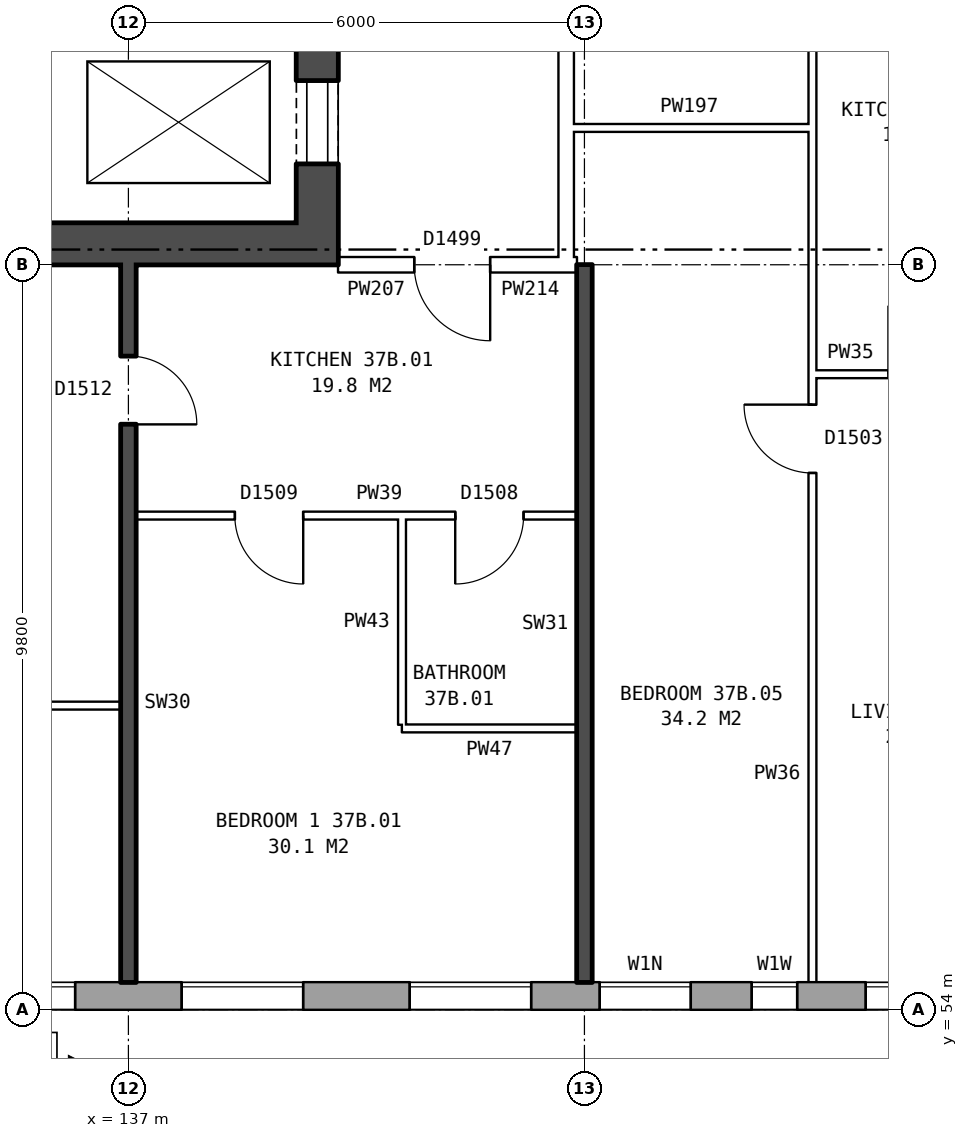
"""IFC4 building model, lengths in metres.
Left out: names, types, materials, properties, quantities, classifications, styles, units other than length and angle.
Written with IfcOpenShell. Run it as: python <this file> out.ifc"""

import sys

from ifc_helpers import new_model, si_unit, direction, frame, frame_2d, origin, place, context, subcontext, project, spatial, rectangle, extrude, element, fill, save


model = new_model("IFC4")
c1 = context("Model", 3, precision=1e-05, world=origin(), true_north=direction((0.0, 1.0)))
c2 = subcontext(c1, "Body", "Model", "MODEL_VIEW")
j1 = project(units=[si_unit("LENGTHUNIT", "METRE"), si_unit("PLANEANGLEUNIT", "RADIAN")], contexts=[c1])
p1 = place(None, origin())
s1 = spatial("IfcSite", under=j1, at=p1, CompositionType="ELEMENT")
p2 = place(p1, origin())
s2 = spatial("IfcBuilding", under=s1, at=p2, CompositionType="ELEMENT")
p3 = place(p2, frame((0.0, 0.0, 133.0)))
s3 = spatial("IfcBuildingStorey", under=s2, at=p3, CompositionType="ELEMENT", Elevation=133.0)
p4 = place(p3, frame((134.075, 54.18, 0.0), z_axis=(0.0, 0.0, 1.0), x_axis=(1.0, 0.0, 0.0)))
e1 = element("IfcWall", 1, at=p4, inside=s3, PredefinedType="STANDARD", context=c2, shape_type="SweptSolid", body=[
    extrude(rectangle(XDim=35.601, YDim=0.36, at=frame_2d((17.8, 0.0))), origin(), (0.0, 0.0, 1.0), 2.85),
])
p5 = place(p4, frame((0.625, 0.0, 0.8)))
e2 = element("IfcOpeningElement", 2, at=p5, cuts=e1, PredefinedType="OPENING", context=c2, shape_type="SweptSolid", body=[
    extrude(rectangle(XDim=1.6, YDim=1.8, at=frame_2d((0.8, 0.9))), frame((0.0, 0.19, 0.0), z_axis=(0.0, -1.0, 0.0), x_axis=(1.0, 0.0, 0.0)), (0.0, 0.0, 1.0), 0.38),
])
p6 = place(p4, frame((3.625, 0.0, 0.8)))
e3 = element("IfcOpeningElement", 3, at=p6, cuts=e1, PredefinedType="OPENING", context=c2, shape_type="SweptSolid", body=[
    extrude(rectangle(XDim=1.6, YDim=1.8, at=frame_2d((0.8, 0.9))), frame((0.0, 0.19, 0.0), z_axis=(0.0, -1.0, 0.0), x_axis=(1.0, 0.0, 0.0)), (0.0, 0.0, 1.0), 0.38),
])
p7 = place(p4, frame((6.625, 0.0, 0.8)))
e4 = element("IfcOpeningElement", 4, at=p7, cuts=e1, PredefinedType="OPENING", context=c2, shape_type="SweptSolid", body=[
    extrude(rectangle(XDim=1.6, YDim=1.8, at=frame_2d((0.8, 0.9))), frame((0.0, 0.19, 0.0), z_axis=(0.0, -1.0, 0.0), x_axis=(1.0, 0.0, 0.0)), (0.0, 0.0, 1.0), 0.38),
])
p8 = place(p4, frame((9.125, 0.0, 1.35)))
e5 = element("IfcOpeningElement", 5, at=p8, cuts=e1, PredefinedType="OPENING", context=c2, shape_type="SweptSolid", body=[
    extrude(rectangle(XDim=1.2, YDim=1.2, at=frame_2d((0.6, 0.6))), frame((0.0, 0.19, 0.0), z_axis=(0.0, -1.0, 0.0), x_axis=(1.0, 0.0, 0.0)), (0.0, 0.0, 1.0), 0.38),
])
p9 = place(p4, frame((12.625, 0.0, 0.8)))
e6 = element("IfcOpeningElement", 6, at=p9, cuts=e1, PredefinedType="OPENING", context=c2, shape_type="SweptSolid", body=[
    extrude(rectangle(XDim=1.6, YDim=1.8, at=frame_2d((0.8, 0.9))), frame((0.0, 0.19, 0.0), z_axis=(0.0, -1.0, 0.0), x_axis=(1.0, 0.0, 0.0)), (0.0, 0.0, 1.0), 0.38),
])
p10 = place(p4, frame((15.625, 0.0, 0.8)))
e7 = element("IfcOpeningElement", 7, at=p10, cuts=e1, PredefinedType="OPENING", context=c2, shape_type="SweptSolid", body=[
    extrude(rectangle(XDim=1.6, YDim=1.8, at=frame_2d((0.8, 0.9))), frame((0.0, 0.19, 0.0), z_axis=(0.0, -1.0, 0.0), x_axis=(1.0, 0.0, 0.0)), (0.0, 0.0, 1.0), 0.38),
])
p11 = place(p4, frame((18.625, 0.0, 0.8)))
e8 = element("IfcOpeningElement", 8, at=p11, cuts=e1, PredefinedType="OPENING", context=c2, shape_type="SweptSolid", body=[
    extrude(rectangle(XDim=1.6, YDim=1.8, at=frame_2d((0.8, 0.9))), frame((0.0, 0.19, 0.0), z_axis=(0.0, -1.0, 0.0), x_axis=(1.0, 0.0, 0.0)), (0.0, 0.0, 1.0), 0.38),
])
p12 = place(p4, frame((21.625, 0.0, 0.8)))
e9 = element("IfcOpeningElement", 9, at=p12, cuts=e1, PredefinedType="OPENING", context=c2, shape_type="SweptSolid", body=[
    extrude(rectangle(XDim=1.6, YDim=1.8, at=frame_2d((0.8, 0.9))), frame((0.0, 0.19, 0.0), z_axis=(0.0, -1.0, 0.0), x_axis=(1.0, 0.0, 0.0)), (0.0, 0.0, 1.0), 0.38),
])
p13 = place(p4, frame((24.975, 0.0, 1.7)))
e10 = element("IfcOpeningElement", 10, at=p13, cuts=e1, PredefinedType="OPENING", context=c2, shape_type="SweptSolid", body=[
    extrude(rectangle(XDim=0.6, YDim=0.9, at=frame_2d((0.3, 0.45))), frame((0.0, 0.19, 0.0), z_axis=(0.0, -1.0, 0.0), x_axis=(1.0, 0.0, 0.0)), (0.0, 0.0, 1.0), 0.38),
])
p14 = place(p4, frame((27.625, 0.0, 0.8)))
e11 = element("IfcOpeningElement", 11, at=p14, cuts=e1, PredefinedType="OPENING", context=c2, shape_type="SweptSolid", body=[
    extrude(rectangle(XDim=1.6, YDim=1.8, at=frame_2d((0.8, 0.9))), frame((0.0, 0.19, 0.0), z_axis=(0.0, -1.0, 0.0), x_axis=(1.0, 0.0, 0.0)), (0.0, 0.0, 1.0), 0.38),
])
p15 = place(p4, frame((30.625, 0.0, 0.8)))
e12 = element("IfcOpeningElement", 12, at=p15, cuts=e1, PredefinedType="OPENING", context=c2, shape_type="SweptSolid", body=[
    extrude(rectangle(XDim=1.6, YDim=1.8, at=frame_2d((0.8, 0.9))), frame((0.0, 0.19, 0.0), z_axis=(0.0, -1.0, 0.0), x_axis=(1.0, 0.0, 0.0)), (0.0, 0.0, 1.0), 0.38),
])
p16 = place(p4, frame((33.625, 0.0, 0.8)))
e13 = element("IfcOpeningElement", 13, at=p16, cuts=e1, PredefinedType="OPENING", context=c2, shape_type="SweptSolid", body=[
    extrude(rectangle(XDim=1.6, YDim=1.8, at=frame_2d((0.8, 0.9))), frame((0.0, 0.19, 0.0), z_axis=(0.0, -1.0, 0.0), x_axis=(1.0, 0.0, 0.0)), (0.0, 0.0, 1.0), 0.38),
])
p17 = place(p4, frame((11.125, 0.0, 0.15)))
e14 = element("IfcOpeningElement", 14, at=p17, cuts=e1, PredefinedType="OPENING", context=c2, shape_type="SweptSolid", body=[
    extrude(rectangle(XDim=0.6, YDim=0.9, at=frame_2d((0.3, 0.45))), frame((0.0, 0.19, 0.0), z_axis=(0.0, -1.0, 0.0), x_axis=(1.0, 0.0, 0.0)), (0.0, 0.0, 1.0), 0.38),
])
p18 = place(p4, frame((25.875, 0.0, 0.8)))
e15 = element("IfcOpeningElement", 15, at=p18, cuts=e1, PredefinedType="OPENING", context=c2, shape_type="SweptSolid", body=[
    extrude(rectangle(XDim=0.8, YDim=1.8, at=frame_2d((0.4, 0.9))), frame((0.0, 0.19, 0.0), z_axis=(0.0, -1.0, 0.0), x_axis=(1.0, 0.0, 0.0)), (0.0, 0.0, 1.0), 0.38),
])
p19 = place(p3, frame((139.485, 63.8, 0.0), z_axis=(0.0, 0.0, 1.0), x_axis=(0.0, 1.0, 0.0)))
e16 = element("IfcWall", 16, at=p19, inside=s3, PredefinedType="SHEAR", context=c2, shape_type="SweptSolid", body=[
    extrude(rectangle(XDim=12.4, YDim=0.55, at=frame_2d((6.2, 0.0))), origin(), (0.0, 0.0, 1.0), 2.85),
])
p20 = place(p19, frame((1.325, 0.0, 0.0)))
e17 = element("IfcOpeningElement", 17, at=p20, cuts=e16, PredefinedType="OPENING", context=c2, shape_type="SweptSolid", body=[
    extrude(rectangle(XDim=1.1, YDim=2.1, at=frame_2d((0.55, 1.05))), frame((0.0, 0.285, 0.0), z_axis=(0.0, -1.0, 0.0), x_axis=(1.0, 0.0, 0.0)), (0.0, 0.0, 1.0), 0.57),
])
p21 = place(p19, frame((3.6, 0.0, 0.0)))
e18 = element("IfcOpeningElement", 18, at=p21, cuts=e16, PredefinedType="OPENING", context=c2, shape_type="SweptSolid", body=[
    extrude(rectangle(XDim=1.1, YDim=2.1, at=frame_2d((0.55, 1.05))), frame((0.0, 0.285, 0.0), z_axis=(0.0, -1.0, 0.0), x_axis=(1.0, 0.0, 0.0)), (0.0, 0.0, 1.0), 0.57),
])
p22 = place(p19, frame((5.8, 0.0, 0.0)))
e19 = element("IfcOpeningElement", 19, at=p22, cuts=e16, PredefinedType="OPENING", context=c2, shape_type="SweptSolid", body=[
    extrude(rectangle(XDim=1.1, YDim=2.1, at=frame_2d((0.55, 1.05))), frame((0.0, 0.285, 0.0), z_axis=(0.0, -1.0, 0.0), x_axis=(1.0, 0.0, 0.0)), (0.0, 0.0, 1.0), 0.57),
])
p23 = place(p19, frame((9.9, 0.0, 0.0)))
e20 = element("IfcOpeningElement", 20, at=p23, cuts=e16, PredefinedType="OPENING", context=c2, shape_type="SweptSolid", body=[
    extrude(rectangle(XDim=1.1, YDim=2.1, at=frame_2d((0.55, 1.05))), frame((0.0, 0.285, 0.0), z_axis=(0.0, -1.0, 0.0), x_axis=(1.0, 0.0, 0.0)), (0.0, 0.0, 1.0), 0.57),
])
p24 = place(p19, frame((8.125, 0.0, 0.0)))
e21 = element("IfcOpeningElement", 21, at=p24, cuts=e16, PredefinedType="OPENING", context=c2, shape_type="SweptSolid", body=[
    extrude(rectangle(XDim=0.85, YDim=2.1, at=frame_2d((0.425, 1.05))), frame((0.0, 0.285, 0.0), z_axis=(0.0, -1.0, 0.0), x_axis=(1.0, 0.0, 0.0)), (0.0, 0.0, 1.0), 0.57),
])
p25 = place(p3, frame((139.21, 64.075, 0.0), z_axis=(0.0, 0.0, 1.0), x_axis=(-1.0, 0.0, 0.0)))
e22 = element("IfcWall", 22, at=p25, inside=s3, PredefinedType="SHEAR", context=c2, shape_type="SweptSolid", body=[
    extrude(rectangle(XDim=7.3, YDim=0.55, at=frame_2d((3.65, 0.0))), origin(), (0.0, 0.0, 1.0), 2.85),
])
p26 = place(p3, frame((142.76, 63.9, 0.0), z_axis=(0.0, 0.0, 1.0), x_axis=(0.0, 1.0, 0.0)))
e23 = element("IfcWall", 23, at=p26, inside=s3, PredefinedType="PARTITIONING", context=c2, shape_type="SweptSolid", body=[
    extrude(rectangle(XDim=12.2, YDim=0.2, at=frame_2d((6.1, 0.0))), origin(), (0.0, 0.0, 1.0), 2.85),
])
p27 = place(p26, frame((5.1, 0.0, 0.0)))
e24 = element("IfcOpeningElement", 24, at=p27, cuts=e23, PredefinedType="OPENING", context=c2, shape_type="SweptSolid", body=[
    extrude(rectangle(XDim=2.0, YDim=2.1, at=frame_2d((1.0, 1.05))), frame((0.0, 0.11, 0.0), z_axis=(0.0, -1.0, 0.0), x_axis=(1.0, 0.0, 0.0)), (0.0, 0.0, 1.0), 0.22),
])
p28 = place(p3, frame((140.6, 57.7, 0.0), z_axis=(0.0, 0.0, 1.0), x_axis=(1.0, 0.0, 0.0)))
e25 = element("IfcWall", 25, at=p28, inside=s3, PredefinedType="PARTITIONING", context=c2, shape_type="SweptSolid", body=[
    extrude(rectangle(XDim=2.3, YDim=0.1, at=frame_2d((1.15, 0.0))), origin(), (0.0, 0.0, 1.0), 2.85),
])
p29 = place(p3, frame((131.36, 58.0, 0.0), z_axis=(0.0, 0.0, 1.0), x_axis=(1.0, 0.0, 0.0)))
e26 = element("IfcWall", 26, at=p29, inside=s3, PredefinedType="PARTITIONING", context=c2, shape_type="SweptSolid", body=[
    extrude(rectangle(XDim=5.54, YDim=0.1, at=frame_2d((2.77, 0.0))), origin(), (0.0, 0.0, 1.0), 2.85),
])
p30 = place(p29, frame((2.32, 0.0, 0.0)))
e27 = element("IfcOpeningElement", 27, at=p30, cuts=e26, PredefinedType="OPENING", context=c2, shape_type="SweptSolid", body=[
    extrude(rectangle(XDim=0.9, YDim=2.1, at=frame_2d((0.45, 1.05))), frame((0.0, 0.06, 0.0), z_axis=(0.0, -1.0, 0.0), x_axis=(1.0, 0.0, 0.0)), (0.0, 0.0, 1.0), 0.12),
])
p31 = place(p3, frame((137.1, 60.5, 0.0), z_axis=(0.0, 0.0, 1.0), x_axis=(1.0, 0.0, 0.0)))
e28 = element("IfcWall", 28, at=p31, inside=s3, PredefinedType="PARTITIONING", context=c2, shape_type="SweptSolid", body=[
    extrude(rectangle(XDim=5.8, YDim=0.1, at=frame_2d((2.9, 0.0))), origin(), (0.0, 0.0, 1.0), 2.85),
])
p32 = place(p31, frame((1.3, 0.0, 0.0)))
e29 = element("IfcOpeningElement", 29, at=p32, cuts=e28, PredefinedType="OPENING", context=c2, shape_type="SweptSolid", body=[
    extrude(rectangle(XDim=0.9, YDim=2.1, at=frame_2d((0.45, 1.05))), frame((0.0, 0.06, 0.0), z_axis=(0.0, -1.0, 0.0), x_axis=(1.0, 0.0, 0.0)), (0.0, 0.0, 1.0), 0.12),
])
p33 = place(p31, frame((4.2, 0.0, 0.0)))
e30 = element("IfcOpeningElement", 30, at=p33, cuts=e28, PredefinedType="OPENING", context=c2, shape_type="SweptSolid", body=[
    extrude(rectangle(XDim=0.9, YDim=2.1, at=frame_2d((0.45, 1.05))), frame((0.0, 0.06, 0.0), z_axis=(0.0, -1.0, 0.0), x_axis=(1.0, 0.0, 0.0)), (0.0, 0.0, 1.0), 0.12),
])
p34 = place(p3, frame((146.0, 62.36, 0.0), z_axis=(0.0, 0.0, 1.0), x_axis=(1.0, 0.0, 0.0)))
e31 = element("IfcWall", 31, at=p34, inside=s3, PredefinedType="PARTITIONING", context=c2, shape_type="SweptSolid", body=[
    extrude(rectangle(XDim=2.9, YDim=0.1, at=frame_2d((1.45, 0.0))), origin(), (0.0, 0.0, 1.0), 2.85),
])
p35 = place(p34, frame((1.0, 0.0, 0.0)))
e32 = element("IfcOpeningElement", 32, at=p35, cuts=e31, PredefinedType="OPENING", context=c2, shape_type="SweptSolid", body=[
    extrude(rectangle(XDim=0.9, YDim=2.1, at=frame_2d((0.45, 1.05))), frame((0.0, 0.06, 0.0), z_axis=(0.0, -1.0, 0.0), x_axis=(1.0, 0.0, 0.0)), (0.0, 0.0, 1.0), 0.12),
])
p36 = place(p3, frame((139.76, 63.8, 0.0), z_axis=(0.0, 0.0, 1.0), x_axis=(1.0, 0.0, 0.0)))
e33 = element("IfcWall", 33, at=p36, inside=s3, PredefinedType="PARTITIONING", context=c2, shape_type="SweptSolid", body=[
    extrude(rectangle(XDim=3.0, YDim=0.2, at=frame_2d((1.5, 0.0))), origin(), (0.0, 0.0, 1.0), 2.85),
])
p37 = place(p36, frame((1.0, 0.0, 0.0)))
e34 = element("IfcOpeningElement", 34, at=p37, cuts=e33, PredefinedType="OPENING", context=c2, shape_type="SweptSolid", body=[
    extrude(rectangle(XDim=1.0, YDim=2.1, at=frame_2d((0.5, 1.05))), frame((0.0, 0.11, 0.0), z_axis=(0.0, -1.0, 0.0), x_axis=(1.0, 0.0, 0.0)), (0.0, 0.0, 1.0), 0.22),
])
p38 = place(p3, frame((142.76, 63.8, 0.0), z_axis=(0.0, 0.0, 1.0), x_axis=(1.0, 0.0, 0.0)))
e35 = element("IfcWall", 35, at=p38, inside=s3, PredefinedType="PARTITIONING", context=c2, shape_type="SweptSolid", body=[
    extrude(rectangle(XDim=0.14, YDim=0.2, at=frame_2d((0.07, 0.0))), origin(), (0.0, 0.0, 1.0), 2.85),
])
p39 = place(p3, frame((142.76, 65.6, 0.0), z_axis=(0.0, 0.0, 1.0), x_axis=(1.0, 0.0, 0.0)))
e36 = element("IfcWall", 36, at=p39, inside=s3, PredefinedType="PARTITIONING", context=c2, shape_type="SweptSolid", body=[
    extrude(rectangle(XDim=3.24, YDim=0.1, at=frame_2d((1.62, 0.0))), origin(), (0.0, 0.0, 1.0), 2.85),
])
p40 = place(p3, frame((137.0, 54.36, 0.0), z_axis=(0.0, 0.0, 1.0), x_axis=(0.0, 1.0, 0.0)))
e37 = element("IfcWall", 37, at=p40, inside=s3, PredefinedType="SOLIDWALL", context=c2, shape_type="SweptSolid", body=[
    extrude(rectangle(XDim=9.44, YDim=0.2, at=frame_2d((4.72, 0.0))), origin(), (0.0, 0.0, 1.0), 2.85),
])
p41 = place(p40, frame((7.34, 0.0, 0.0)))
e38 = element("IfcOpeningElement", 38, at=p41, cuts=e37, PredefinedType="OPENING", context=c2, shape_type="SweptSolid", body=[
    extrude(rectangle(XDim=0.9, YDim=2.1, at=frame_2d((0.45, 1.05))), frame((0.0, 0.11, 0.0), z_axis=(0.0, -1.0, 0.0), x_axis=(1.0, 0.0, 0.0)), (0.0, 0.0, 1.0), 0.22),
])
p42 = place(p3, frame((140.6, 57.75, 0.0), z_axis=(0.0, 0.0, 1.0), x_axis=(0.0, 1.0, 0.0)))
e39 = element("IfcWall", 39, at=p42, inside=s3, PredefinedType="PARTITIONING", context=c2, shape_type="SweptSolid", body=[
    extrude(rectangle(XDim=2.7, YDim=0.1, at=frame_2d((1.35, 0.0))), origin(), (0.0, 0.0, 1.0), 2.85),
])
p43 = place(p3, frame((143.0, 54.36, 0.0), z_axis=(0.0, 0.0, 1.0), x_axis=(0.0, 1.0, 0.0)))
e40 = element("IfcWall", 40, at=p43, inside=s3, PredefinedType="SOLIDWALL", context=c2, shape_type="SweptSolid", body=[
    extrude(rectangle(XDim=9.44, YDim=0.2, at=frame_2d((4.72, 0.0))), origin(), (0.0, 0.0, 1.0), 2.85),
])
p44 = place(p3, frame((146.0, 54.36, 0.0), z_axis=(0.0, 0.0, 1.0), x_axis=(0.0, 1.0, 0.0)))
e41 = element("IfcWall", 41, at=p44, inside=s3, PredefinedType="PARTITIONING", context=c2, shape_type="SweptSolid", body=[
    extrude(rectangle(XDim=14.34, YDim=0.1, at=frame_2d((7.17, 0.0))), origin(), (0.0, 0.0, 1.0), 2.85),
])
p45 = place(p44, frame((6.7, 0.0, 0.0)))
e42 = element("IfcOpeningElement", 42, at=p45, cuts=e41, PredefinedType="OPENING", context=c2, shape_type="SweptSolid", body=[
    extrude(rectangle(XDim=0.9, YDim=2.1, at=frame_2d((0.45, 1.05))), frame((0.0, 0.06, 0.0), z_axis=(0.0, -1.0, 0.0), x_axis=(1.0, 0.0, 0.0)), (0.0, 0.0, 1.0), 0.12),
])
p46 = place(p44, frame((13.04, 0.0, 0.0)))
e43 = element("IfcOpeningElement", 43, at=p46, cuts=e41, PredefinedType="OPENING", context=c2, shape_type="SweptSolid", body=[
    extrude(rectangle(XDim=0.9, YDim=2.1, at=frame_2d((0.45, 1.05))), frame((0.0, 0.06, 0.0), z_axis=(0.0, -1.0, 0.0), x_axis=(1.0, 0.0, 0.0)), (0.0, 0.0, 1.0), 0.12),
])
p47 = place(p5, origin())
e44 = element("IfcWindow", 44, at=p47, inside=s3, PartitioningType="SINGLE_PANEL", PredefinedType="WINDOW", context=c2, shape_type="SweptSolid", body=[
    extrude(rectangle(XDim=1.6, YDim=1.8, at=frame_2d((0.8, 0.9))), frame((0.0, 0.15, 0.0), z_axis=(0.0, -1.0, 0.0), x_axis=(1.0, 0.0, 0.0)), (0.0, 0.0, 1.0), 0.06),
])
fill(e2, e44)
p48 = place(p6, origin())
e45 = element("IfcWindow", 45, at=p48, inside=s3, PartitioningType="SINGLE_PANEL", PredefinedType="WINDOW", context=c2, shape_type="SweptSolid", body=[
    extrude(rectangle(XDim=1.6, YDim=1.8, at=frame_2d((0.8, 0.9))), frame((0.0, 0.15, 0.0), z_axis=(0.0, -1.0, 0.0), x_axis=(1.0, 0.0, 0.0)), (0.0, 0.0, 1.0), 0.06),
])
fill(e3, e45)
p49 = place(p7, origin())
e46 = element("IfcWindow", 46, at=p49, inside=s3, PartitioningType="SINGLE_PANEL", PredefinedType="WINDOW", context=c2, shape_type="SweptSolid", body=[
    extrude(rectangle(XDim=1.6, YDim=1.8, at=frame_2d((0.8, 0.9))), frame((0.0, 0.15, 0.0), z_axis=(0.0, -1.0, 0.0), x_axis=(1.0, 0.0, 0.0)), (0.0, 0.0, 1.0), 0.06),
])
fill(e4, e46)
p50 = place(p8, origin())
e47 = element("IfcWindow", 47, at=p50, inside=s3, PartitioningType="SINGLE_PANEL", PredefinedType="WINDOW", context=c2, shape_type="SweptSolid", body=[
    extrude(rectangle(XDim=1.2, YDim=1.2, at=frame_2d((0.6, 0.6))), frame((0.0, 0.15, 0.0), z_axis=(0.0, -1.0, 0.0), x_axis=(1.0, 0.0, 0.0)), (0.0, 0.0, 1.0), 0.06),
])
fill(e5, e47)
p51 = place(p9, origin())
e48 = element("IfcWindow", 48, at=p51, inside=s3, PartitioningType="SINGLE_PANEL", PredefinedType="WINDOW", context=c2, shape_type="SweptSolid", body=[
    extrude(rectangle(XDim=1.6, YDim=1.8, at=frame_2d((0.8, 0.9))), frame((0.0, 0.15, 0.0), z_axis=(0.0, -1.0, 0.0), x_axis=(1.0, 0.0, 0.0)), (0.0, 0.0, 1.0), 0.06),
])
fill(e6, e48)
p52 = place(p20, origin())
e49 = element("IfcDoor", 49, at=p52, inside=s3, OperationType="DOUBLE_DOOR_SLIDING", PredefinedType="DOOR", context=c2, shape_type="SweptSolid", body=[
    extrude(rectangle(XDim=1.1, YDim=2.1, at=frame_2d((0.55, 1.05))), frame((0.0, 0.26, 0.0), z_axis=(0.0, -1.0, 0.0), x_axis=(1.0, 0.0, 0.0)), (0.0, 0.0, 1.0), 0.05),
])
fill(e17, e49)
p53 = place(p32, frame((0.9, 0.0, 0.0), z_axis=(0.0, 0.0, 1.0), x_axis=(-1.0, 0.0, 0.0)))
e50 = element("IfcDoor", 50, at=p53, inside=s3, OperationType="SINGLE_SWING_LEFT", PredefinedType="DOOR", context=c2, shape_type="SweptSolid", body=[
    extrude(rectangle(XDim=0.9, YDim=2.1, at=frame_2d((0.45, 1.05))), frame((0.0, 0.025, 0.0), z_axis=(0.0, -1.0, 0.0), x_axis=(1.0, 0.0, 0.0)), (0.0, 0.0, 1.0), 0.05),
])
fill(e29, e50)
p54 = place(p37, frame((1.0, 0.0, 0.0), z_axis=(0.0, 0.0, 1.0), x_axis=(-1.0, 0.0, 0.0)))
e51 = element("IfcDoor", 51, at=p54, inside=s3, OperationType="SINGLE_SWING_LEFT", PredefinedType="DOOR", context=c2, shape_type="SweptSolid", body=[
    extrude(rectangle(XDim=1.0, YDim=2.1, at=frame_2d((0.5, 1.05))), frame((0.0, 0.025, 0.0), z_axis=(0.0, -1.0, 0.0), x_axis=(1.0, 0.0, 0.0)), (0.0, 0.0, 1.0), 0.05),
])
fill(e34, e51)
p55 = place(p41, frame((0.9, 0.0, 0.0), z_axis=(0.0, 0.0, 1.0), x_axis=(-1.0, 0.0, 0.0)))
e52 = element("IfcDoor", 52, at=p55, inside=s3, OperationType="SINGLE_SWING_RIGHT", PredefinedType="DOOR", context=c2, shape_type="SweptSolid", body=[
    extrude(rectangle(XDim=0.9, YDim=2.1, at=frame_2d((0.45, 1.05))), frame((0.0, 0.025, 0.0), z_axis=(0.0, -1.0, 0.0), x_axis=(1.0, 0.0, 0.0)), (0.0, 0.0, 1.0), 0.05),
])
fill(e38, e52)
p56 = place(p33, frame((0.9, 0.0, 0.0), z_axis=(0.0, 0.0, 1.0), x_axis=(-1.0, 0.0, 0.0)))
e53 = element("IfcDoor", 53, at=p56, inside=s3, OperationType="SINGLE_SWING_RIGHT", PredefinedType="DOOR", context=c2, shape_type="SweptSolid", body=[
    extrude(rectangle(XDim=0.9, YDim=2.1, at=frame_2d((0.45, 1.05))), frame((0.0, 0.025, 0.0), z_axis=(0.0, -1.0, 0.0), x_axis=(1.0, 0.0, 0.0)), (0.0, 0.0, 1.0), 0.05),
])
fill(e30, e53)
p57 = place(p45, origin())
e54 = element("IfcDoor", 54, at=p57, inside=s3, OperationType="SINGLE_SWING_RIGHT", PredefinedType="DOOR", context=c2, shape_type="SweptSolid", body=[
    extrude(rectangle(XDim=0.9, YDim=2.1, at=frame_2d((0.45, 1.05))), frame((0.0, 0.025, 0.0), z_axis=(0.0, -1.0, 0.0), x_axis=(1.0, 0.0, 0.0)), (0.0, 0.0, 1.0), 0.05),
])
fill(e42, e54)
p58 = place(p17, origin())
e55 = element("IfcWindow", 55, at=p58, inside=s3, PartitioningType="SINGLE_PANEL", PredefinedType="WINDOW", context=c2, shape_type="SweptSolid", body=[
    extrude(rectangle(XDim=0.6, YDim=0.9, at=frame_2d((0.3, 0.45))), frame((0.0, 0.15, 0.0), z_axis=(0.0, -1.0, 0.0), x_axis=(1.0, 0.0, 0.0)), (0.0, 0.0, 1.0), 0.06),
])
fill(e14, e55)
save(model, sys.argv[1])
